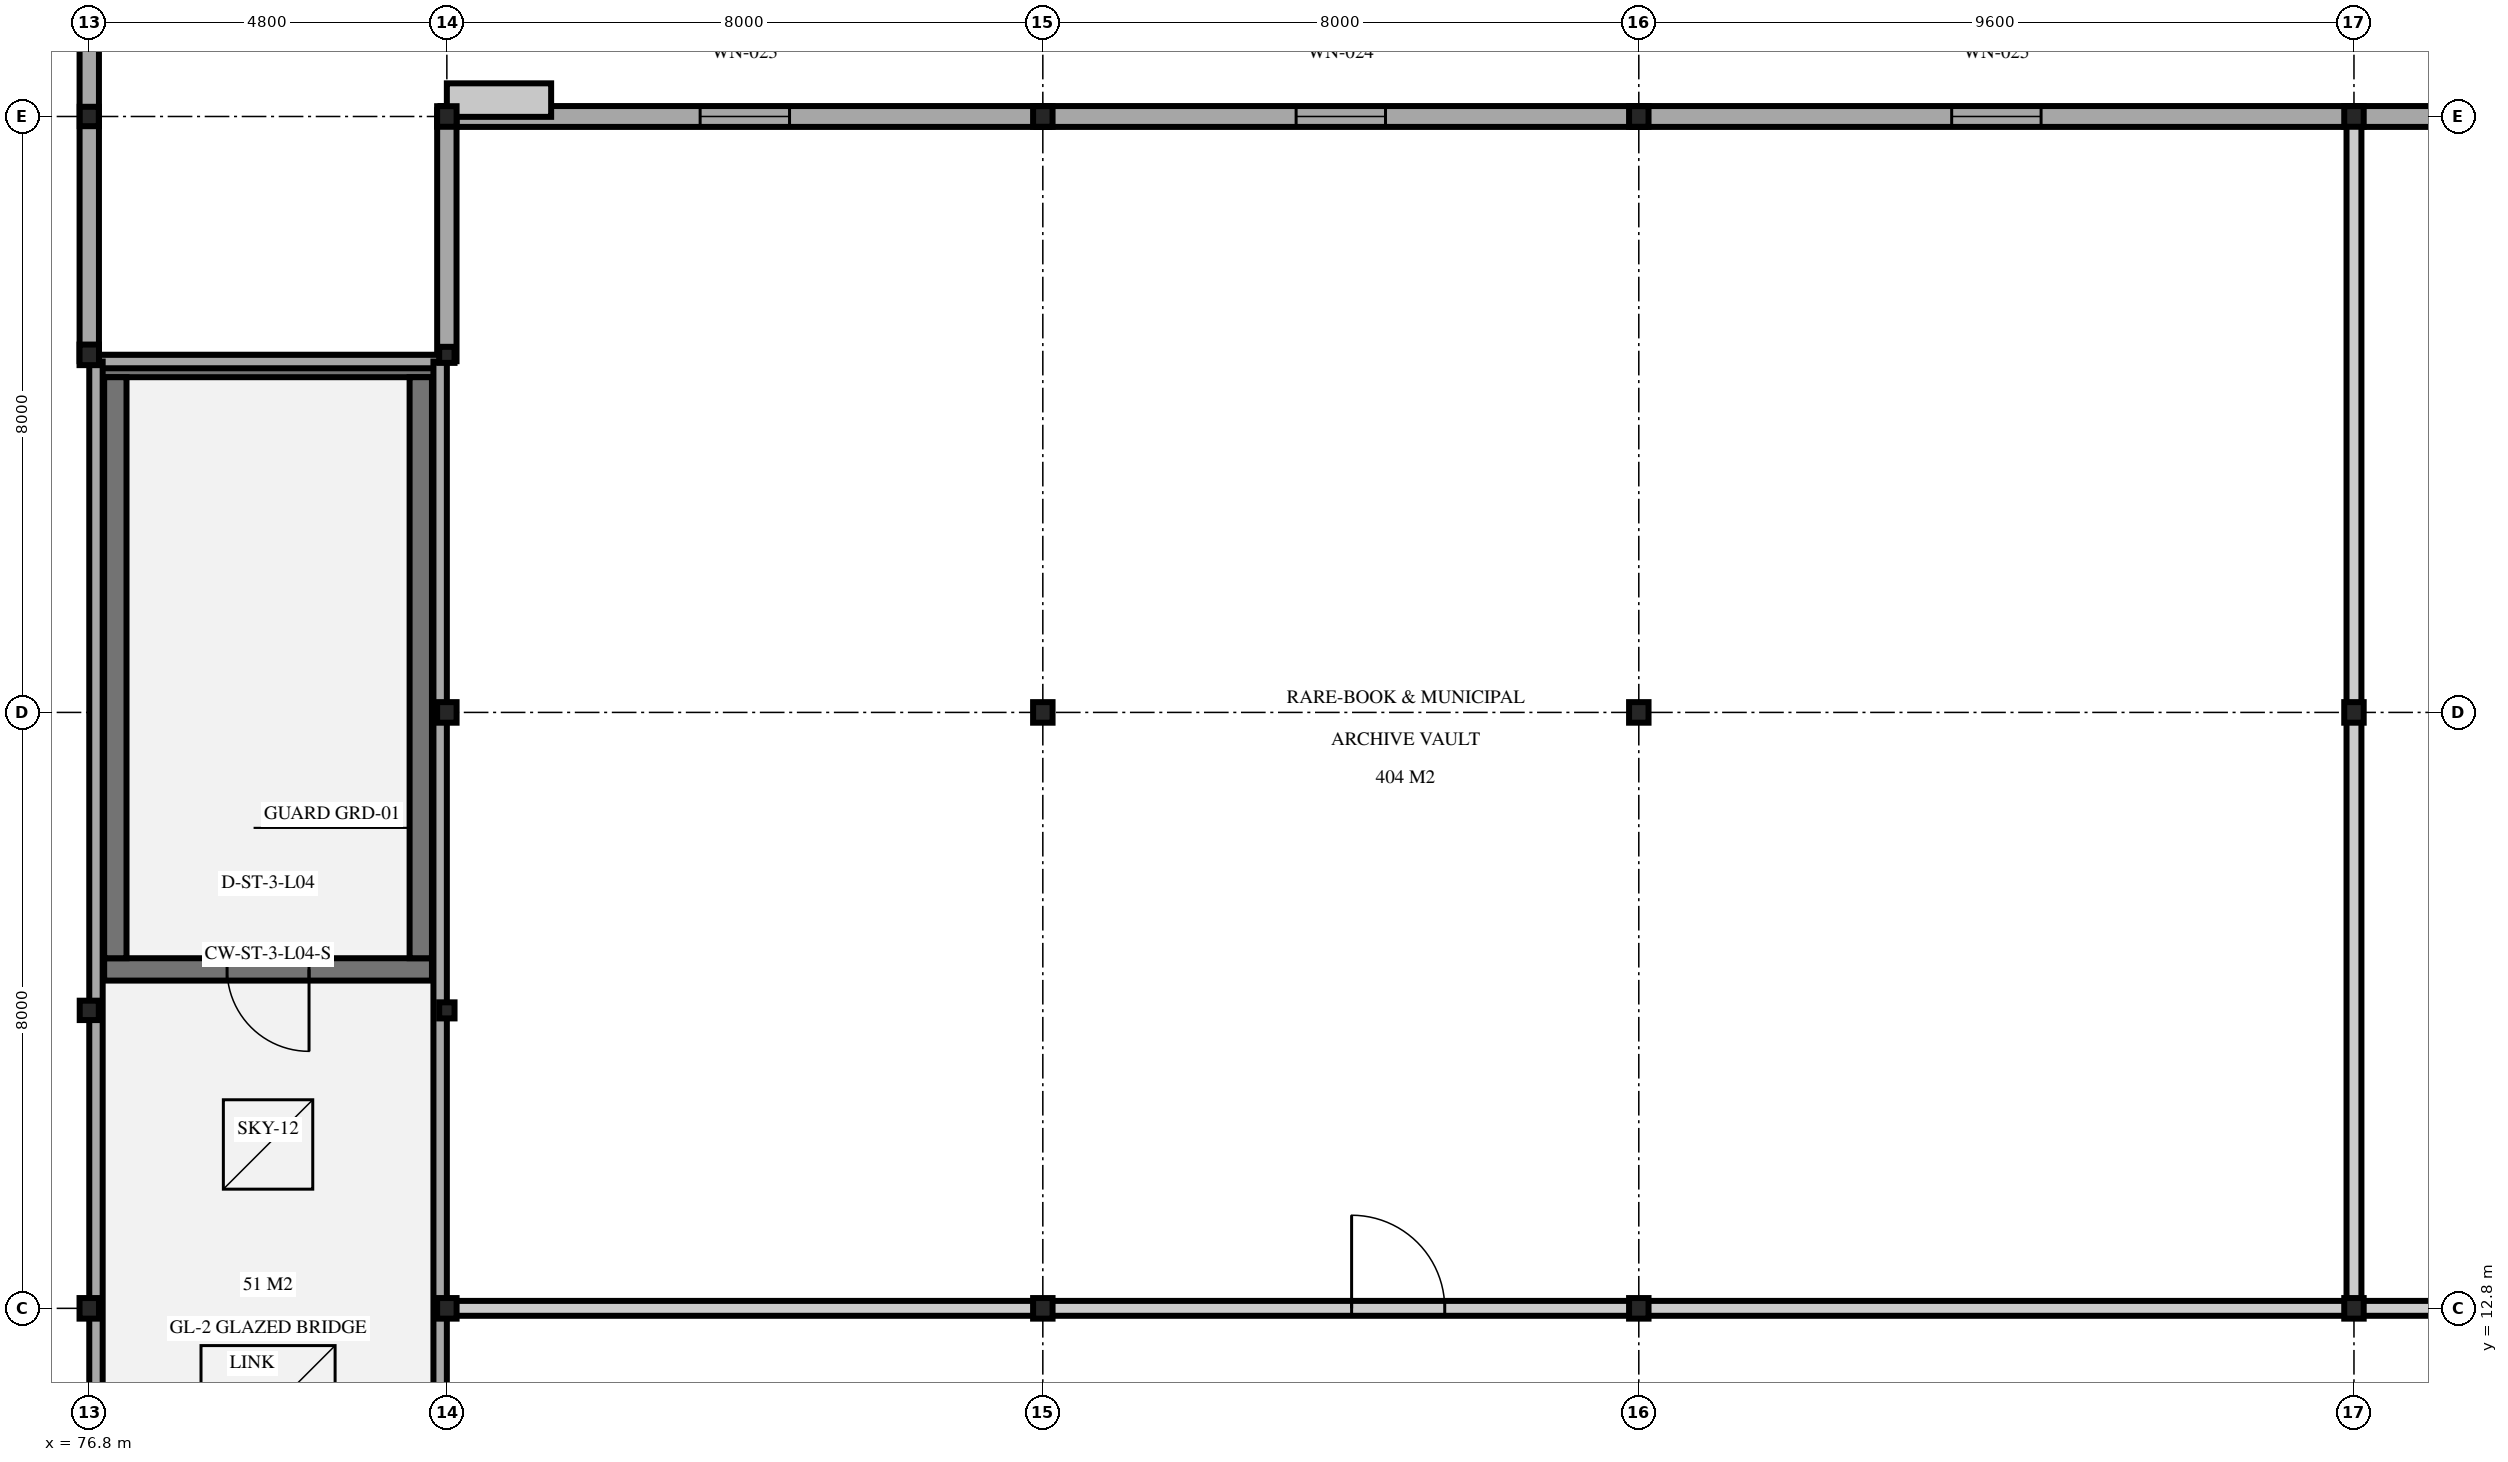
"""IFC4 building model, lengths in metres.
Left out: names, types, materials, properties, quantities, classifications, styles, units other than length and angle.
Written with IfcOpenShell. Run it as: python <this file> out.ifc"""

import sys

from ifc_helpers import new_model, si_unit, direction, frame, frame_2d, origin, origin_2d, place, context, subcontext, project, spatial, rectangle, i_section, extrude, element, fill, save


model = new_model("IFC4")
c1 = context("Model", 3, precision=1e-05, world=origin(), true_north=direction((0.0, 1.0)))
c2 = subcontext(c1, "Body", "Model", "MODEL_VIEW")
j1 = project(units=[si_unit("LENGTHUNIT", "METRE"), si_unit("PLANEANGLEUNIT", "RADIAN")], contexts=[c1])
p1 = place(None, origin())
s1 = spatial("IfcSite", under=j1, at=p1, CompositionType="ELEMENT")
p2 = place(p1, origin())
s2 = spatial("IfcBuilding", under=s1, at=p2, CompositionType="ELEMENT")
p3 = place(p2, frame((0.0, 0.0, 18.6)))
s3 = spatial("IfcBuildingStorey", under=s2, at=p3, CompositionType="ELEMENT", Elevation=18.6)
for number, where, z_axis, x_axis in (
    (1, (76.8, 12.8, 0.0), (0.0, 0.0, 1.0), (1.0, 0.0, 0.0)),
    (2, (76.8, 25.6, 0.0), (0.0, 0.0, 1.0), (1.0, 0.0, 0.0)),
):
    element("IfcColumn", number, at=place(p3, frame(where, z_axis=z_axis, x_axis=x_axis)), inside=s3, PredefinedType="COLUMN", context=c2, shape_type="SweptSolid", body=[
        extrude(i_section(OverallWidth=0.261, OverallDepth=0.276, WebThickness=0.015, FlangeThickness=0.025, at=origin_2d()), origin(), (0.0, 0.0, 1.0), 4.5),
    ])
for number, where, z_axis, x_axis in (
    (3, (76.8, 28.8, 0.0), (0.0, 0.0, 1.0), (1.0, 0.0, 0.0)),
    (4, (76.8, 16.8, 0.0), (0.0, 0.0, 1.0), (1.0, 0.0, 0.0)),
):
    element("IfcColumn", number, at=place(p3, frame(where, z_axis=z_axis, x_axis=x_axis)), inside=s3, PredefinedType="COLUMN", context=c2, shape_type="SweptSolid", body=[
        extrude(i_section(OverallWidth=0.256, OverallDepth=0.26, WebThickness=0.01, FlangeThickness=0.017, at=origin_2d()), origin(), (0.0, 0.0, 1.0), 4.5),
    ])
for number, where, z_axis, x_axis in (
    (5, (81.6, 12.8, 0.0), (0.0, 0.0, 1.0), (1.0, 0.0, 0.0)),
    (6, (81.6, 20.8, 0.0), (0.0, 0.0, 1.0), (1.0, 0.0, 0.0)),
    (7, (81.6, 28.8, 0.0), (0.0, 0.0, 1.0), (1.0, 0.0, 0.0)),
):
    element("IfcColumn", number, at=place(p3, frame(where, z_axis=z_axis, x_axis=x_axis)), inside=s3, PredefinedType="COLUMN", context=c2, shape_type="SweptSolid", body=[
        extrude(i_section(OverallWidth=0.261, OverallDepth=0.276, WebThickness=0.015, FlangeThickness=0.025, at=origin_2d()), origin(), (0.0, 0.0, 1.0), 3.795),
    ])
for number, where, z_axis, x_axis in (
    (8, (89.6, 12.8, 0.0), (0.0, 0.0, 1.0), (1.0, 0.0, 0.0)),
    (9, (89.6, 20.8, 0.0), (0.0, 0.0, 1.0), (1.0, 0.0, 0.0)),
    (10, (89.6, 28.8, 0.0), (0.0, 0.0, 1.0), (1.0, 0.0, 0.0)),
    (11, (97.6, 12.8, 0.0), (0.0, 0.0, 1.0), (1.0, 0.0, 0.0)),
    (12, (97.6, 20.8, 0.0), (0.0, 0.0, 1.0), (1.0, 0.0, 0.0)),
    (13, (97.6, 28.8, 0.0), (0.0, 0.0, 1.0), (1.0, 0.0, 0.0)),
    (14, (107.2, 12.8, 0.0), (0.0, 0.0, 1.0), (1.0, 0.0, 0.0)),
    (15, (107.2, 20.8, 0.0), (0.0, 0.0, 1.0), (1.0, 0.0, 0.0)),
    (16, (107.2, 28.8, 0.0), (0.0, 0.0, 1.0), (1.0, 0.0, 0.0)),
):
    element("IfcColumn", number, at=place(p3, frame(where, z_axis=z_axis, x_axis=x_axis)), inside=s3, PredefinedType="COLUMN", context=c2, shape_type="SweptSolid", body=[
        extrude(i_section(OverallWidth=0.261, OverallDepth=0.276, WebThickness=0.015, FlangeThickness=0.025, at=origin_2d()), origin(), (0.0, 0.0, 1.0), 4.5),
    ])
for number, where, z_axis, x_axis in (
    (17, (81.6, 16.8, 0.0), (0.0, 0.0, 1.0), (1.0, 0.0, 0.0)),
    (18, (81.6, 25.6, 0.0), (0.0, 0.0, 1.0), (1.0, 0.0, 0.0)),
):
    element("IfcColumn", number, at=place(p3, frame(where, z_axis=z_axis, x_axis=x_axis)), inside=s3, PredefinedType="COLUMN", context=c2, shape_type="SweptSolid", body=[
        extrude(i_section(OverallWidth=0.206, OverallDepth=0.216, WebThickness=0.01, FlangeThickness=0.017, at=origin_2d()), origin(), (0.0, 0.0, 1.0), 3.795),
    ])
p4 = place(p3, frame((81.4, 17.35, 0.0), z_axis=(0.0, 0.0, 1.0), x_axis=(-1.0, 0.0, 0.0)))
e19 = element("IfcWall", 19, at=p4, inside=s3, PredefinedType="SHEAR", context=c2, shape_type="SweptSolid", body=[
    extrude(rectangle(XDim=4.4, YDim=0.3, at=frame_2d((2.2, 0.0))), origin(), (0.0, 0.0, 1.0), 2.605),
])
p5 = place(p4, frame((1.65, 0.0, 0.0)))
e20 = element("IfcOpeningElement", 20, at=p5, cuts=e19, PredefinedType="OPENING", context=c2, shape_type="SweptSolid", body=[
    extrude(rectangle(XDim=1.1, YDim=2.2, at=frame_2d((0.55, 1.1))), frame((0.0, 0.16, 0.0), z_axis=(0.0, -1.0, 0.0), x_axis=(1.0, 0.0, 0.0)), (0.0, 0.0, 1.0), 0.32),
])
p6 = place(p3, frame((76.82, 25.45, 0.0), z_axis=(0.0, 0.0, 1.0), x_axis=(1.0, 0.0, 0.0)))
e21 = element("IfcWall", 21, at=p6, inside=s3, PredefinedType="SHEAR", context=c2, shape_type="SweptSolid", body=[
    extrude(rectangle(XDim=4.76, YDim=0.3, at=frame_2d((2.38, 0.0))), origin(), (0.0, 0.0, 1.0), 2.605),
])
for number, where, z_axis, x_axis in (
    (22, (77.15, 17.5, 0.0), (0.0, 0.0, 1.0), (0.0, 1.0, 0.0)),
    (23, (81.25, 25.3, 0.0), (0.0, 0.0, 1.0), (0.0, -1.0, 0.0)),
):
    element("IfcWall", number, at=place(p3, frame(where, z_axis=z_axis, x_axis=x_axis)), inside=s3, PredefinedType="SHEAR", context=c2, shape_type="SweptSolid", body=[
        extrude(rectangle(XDim=7.8, YDim=0.3, at=frame_2d((3.9, 0.0))), origin(), (0.0, 0.0, 1.0), 2.605),
    ])
p7 = place(p3, frame((76.8, 36.885, 0.0), z_axis=(0.0, 0.0, 1.0), x_axis=(0.0, -1.0, 0.0)))
e24 = element("IfcWall", 24, at=p7, inside=s3, PredefinedType="SOLIDWALL", context=c2, shape_type="SweptSolid", body=[
    extrude(rectangle(XDim=11.37, YDim=0.26, at=frame_2d((5.685, 0.0))), origin(), (0.0, 0.0, 1.0), 3.855),
])
p8 = place(p3, frame((81.515, 28.8, 0.0), z_axis=(0.0, 0.0, 1.0), x_axis=(1.0, 0.0, 0.0)))
e25 = element("IfcWall", 25, at=p8, inside=s3, PredefinedType="SOLIDWALL", context=c2, shape_type="SweptSolid", body=[
    extrude(rectangle(XDim=8.17, YDim=0.28, at=frame_2d((4.085, 0.0))), origin(), (0.0, 0.0, 1.0), 3.471),
])
p9 = place(p8, frame((3.485, 0.0, 1.2)))
e26 = element("IfcOpeningElement", 26, at=p9, cuts=e25, PredefinedType="OPENING", context=c2, shape_type="SweptSolid", body=[
    extrude(rectangle(XDim=1.2, YDim=1.5, at=frame_2d((0.6, 0.75))), frame((0.0, 0.15, 0.0), z_axis=(0.0, -1.0, 0.0), x_axis=(1.0, 0.0, 0.0)), (0.0, 0.0, 1.0), 0.3),
])
p10 = place(p3, frame((89.515, 28.8, 0.0), z_axis=(0.0, 0.0, 1.0), x_axis=(1.0, 0.0, 0.0)))
e27 = element("IfcWall", 27, at=p10, inside=s3, PredefinedType="SOLIDWALL", context=c2, shape_type="SweptSolid", body=[
    extrude(rectangle(XDim=8.17, YDim=0.28, at=frame_2d((4.085, 0.0))), origin(), (0.0, 0.0, 1.0), 3.471),
])
p11 = place(p10, frame((3.485, 0.0, 1.2)))
e28 = element("IfcOpeningElement", 28, at=p11, cuts=e27, PredefinedType="OPENING", context=c2, shape_type="SweptSolid", body=[
    extrude(rectangle(XDim=1.2, YDim=1.5, at=frame_2d((0.6, 0.75))), frame((0.0, 0.15, 0.0), z_axis=(0.0, -1.0, 0.0), x_axis=(1.0, 0.0, 0.0)), (0.0, 0.0, 1.0), 0.3),
])
p12 = place(p3, frame((97.515, 28.8, 0.0), z_axis=(0.0, 0.0, 1.0), x_axis=(1.0, 0.0, 0.0)))
e29 = element("IfcWall", 29, at=p12, inside=s3, PredefinedType="SOLIDWALL", context=c2, shape_type="SweptSolid", body=[
    extrude(rectangle(XDim=9.77, YDim=0.28, at=frame_2d((4.885, 0.0))), origin(), (0.0, 0.0, 1.0), 5.249),
])
p13 = place(p12, frame((4.285, 0.0, 1.2)))
e30 = element("IfcOpeningElement", 30, at=p13, cuts=e29, PredefinedType="OPENING", context=c2, shape_type="SweptSolid", body=[
    extrude(rectangle(XDim=1.2, YDim=1.5, at=frame_2d((0.6, 0.75))), frame((0.0, 0.15, 0.0), z_axis=(0.0, -1.0, 0.0), x_axis=(1.0, 0.0, 0.0)), (0.0, 0.0, 1.0), 0.3),
])
p14 = place(p3, frame((107.115, 28.8, 0.0), z_axis=(0.0, 0.0, 1.0), x_axis=(1.0, 0.0, 0.0)))
e31 = element("IfcWall", 31, at=p14, inside=s3, PredefinedType="SOLIDWALL", context=c2, shape_type="SweptSolid", body=[
    extrude(rectangle(XDim=9.77, YDim=0.28, at=frame_2d((4.885, 0.0))), origin(), (0.0, 0.0, 1.0), 7.027),
])
p15 = place(p14, frame((4.285, 0.0, 1.2)))
e32 = element("IfcOpeningElement", 32, at=p15, cuts=e31, PredefinedType="OPENING", context=c2, shape_type="SweptSolid", body=[
    extrude(rectangle(XDim=1.2, YDim=1.5, at=frame_2d((0.6, 0.75))), frame((0.0, 0.15, 0.0), z_axis=(0.0, -1.0, 0.0), x_axis=(1.0, 0.0, 0.0)), (0.0, 0.0, 1.0), 0.3),
])
p16 = place(p3, frame((81.6, 25.515, 0.0), z_axis=(0.0, 0.0, 1.0), x_axis=(0.0, 1.0, 0.0)))
e33 = element("IfcWall", 33, at=p16, inside=s3, PredefinedType="SOLIDWALL", context=c2, shape_type="SweptSolid", body=[
    extrude(rectangle(XDim=3.37, YDim=0.26, at=frame_2d((1.685, 0.0))), origin(), (0.0, 0.0, 1.0), 3.471),
])
p17 = place(p3, frame((76.89, 25.51, 2.85), z_axis=(0.0, 0.0, 1.0), x_axis=(1.0, 0.0, 0.0)))
e34 = element("IfcWall", 34, at=p17, inside=s3, PredefinedType="PARAPET", context=c2, shape_type="SweptSolid", body=[
    extrude(rectangle(XDim=4.62, YDim=0.18, at=frame_2d((2.31, 0.0))), origin(), (0.0, 0.0, 1.0), 0.45),
])
for number, where, z_axis, x_axis in (
    (35, (76.89, 7.29, 2.85), (0.0, 0.0, 1.0), (0.0, 1.0, 0.0)),
    (36, (81.51, 25.51, 2.85), (0.0, 0.0, 1.0), (0.0, -1.0, 0.0)),
):
    element("IfcWall", number, at=place(p3, frame(where, z_axis=z_axis, x_axis=x_axis)), inside=s3, PredefinedType="PARAPET", context=c2, shape_type="SweptSolid", body=[
        extrude(rectangle(XDim=18.22, YDim=0.18, at=frame_2d((9.11, 0.0))), origin(), (0.0, 0.0, 1.0), 0.45),
    ])
p18 = place(p3, frame((81.64, 12.8, 0.0), z_axis=(0.0, 0.0, 1.0), x_axis=(1.0, 0.0, 0.0)))
e37 = element("IfcWall", 37, at=p18, inside=s3, PredefinedType="PARTITIONING", context=c2, shape_type="SweptSolid", body=[
    extrude(rectangle(XDim=25.46, YDim=0.2, at=frame_2d((12.73, 0.0))), origin(), (0.0, 0.0, 1.0), 3.471),
])
p19 = place(p18, frame((12.105, 0.0, 0.0)))
e38 = element("IfcOpeningElement", 38, at=p19, cuts=e37, PredefinedType="OPENING", context=c2, shape_type="SweptSolid", body=[
    extrude(rectangle(XDim=1.25, YDim=2.25, at=frame_2d((0.625, 1.125))), frame((0.0, 0.11, 0.0), z_axis=(0.0, -1.0, 0.0), x_axis=(1.0, 0.0, 0.0)), (0.0, 0.0, 1.0), 0.22),
])
p20 = place(p3, frame((107.2, 12.7, 0.0), z_axis=(0.0, 0.0, 1.0), x_axis=(0.0, 1.0, 0.0)))
e39 = element("IfcWall", 39, at=p20, inside=s3, PredefinedType="PARTITIONING", context=c2, shape_type="SweptSolid", body=[
    extrude(rectangle(XDim=16.06, YDim=0.2, at=frame_2d((8.03, 0.0))), origin(), (0.0, 0.0, 1.0), 7.027),
])
p21 = place(p3, frame((107.2, 12.8, 0.0), z_axis=(0.0, 0.0, 1.0), x_axis=(1.0, 0.0, 0.0)))
e40 = element("IfcWall", 40, at=p21, inside=s3, PredefinedType="PARTITIONING", context=c2, shape_type="SweptSolid", body=[
    extrude(rectangle(XDim=17.56, YDim=0.2, at=frame_2d((8.78, 0.0))), origin(), (0.0, 0.0, 1.0), 7.027),
])
p22 = place(p21, frame((6.905, 0.0, 0.0)))
e41 = element("IfcOpeningElement", 41, at=p22, cuts=e40, PredefinedType="OPENING", context=c2, shape_type="SweptSolid", body=[
    extrude(rectangle(XDim=1.25, YDim=2.25, at=frame_2d((0.625, 1.125))), frame((0.0, 0.11, 0.0), z_axis=(0.0, -1.0, 0.0), x_axis=(1.0, 0.0, 0.0)), (0.0, 0.0, 1.0), 0.22),
])
p23 = place(p5, origin())
e42 = element("IfcDoor", 42, at=p23, inside=s3, OperationType="SINGLE_SWING_LEFT", PredefinedType="DOOR", context=c2, shape_type="SweptSolid", body=[
    extrude(rectangle(XDim=1.1, YDim=2.2, at=frame_2d((0.55, 1.1))), frame((0.0, 0.025, 0.0), z_axis=(0.0, -1.0, 0.0), x_axis=(1.0, 0.0, 0.0)), (0.0, 0.0, 1.0), 0.05),
])
fill(e20, e42)
p24 = place(p9, origin())
e43 = element("IfcWindow", 43, at=p24, inside=s3, PartitioningType="SINGLE_PANEL", PredefinedType="WINDOW", context=c2, shape_type="SweptSolid", body=[
    extrude(rectangle(XDim=1.2, YDim=1.5, at=frame_2d((0.6, 0.75))), frame((0.0, 0.03, 0.0), z_axis=(0.0, -1.0, 0.0), x_axis=(1.0, 0.0, 0.0)), (0.0, 0.0, 1.0), 0.06),
])
fill(e26, e43)
p25 = place(p11, origin())
e44 = element("IfcWindow", 44, at=p25, inside=s3, PartitioningType="SINGLE_PANEL", PredefinedType="WINDOW", context=c2, shape_type="SweptSolid", body=[
    extrude(rectangle(XDim=1.2, YDim=1.5, at=frame_2d((0.6, 0.75))), frame((0.0, 0.03, 0.0), z_axis=(0.0, -1.0, 0.0), x_axis=(1.0, 0.0, 0.0)), (0.0, 0.0, 1.0), 0.06),
])
fill(e28, e44)
p26 = place(p13, origin())
e45 = element("IfcWindow", 45, at=p26, inside=s3, PartitioningType="SINGLE_PANEL", PredefinedType="WINDOW", context=c2, shape_type="SweptSolid", body=[
    extrude(rectangle(XDim=1.2, YDim=1.5, at=frame_2d((0.6, 0.75))), frame((0.0, 0.03, 0.0), z_axis=(0.0, -1.0, 0.0), x_axis=(1.0, 0.0, 0.0)), (0.0, 0.0, 1.0), 0.06),
])
fill(e30, e45)
p27 = place(p3, frame((0.0, 0.0, 2.6)))
p28 = place(p27, frame((79.2, 11.4, 0.2)))
e46 = element("IfcWindow", 46, at=p28, inside=s3, PartitioningType="SINGLE_PANEL", PredefinedType="SKYLIGHT", context=c2, shape_type="SweptSolid", body=[
    extrude(rectangle(XDim=1.8, YDim=1.8, at=origin_2d()), origin(), (0.0, 0.0, 1.0), 0.05),
])
p29 = place(p27, frame((79.2, 15.0, 0.2)))
e47 = element("IfcWindow", 47, at=p29, inside=s3, PartitioningType="SINGLE_PANEL", PredefinedType="SKYLIGHT", context=c2, shape_type="SweptSolid", body=[
    extrude(rectangle(XDim=1.2, YDim=1.2, at=origin_2d()), origin(), (0.0, 0.0, 1.0), 0.05),
])
p30 = place(p19, origin())
e48 = element("IfcDoor", 48, at=p30, inside=s3, OperationType="SINGLE_SWING_LEFT", PredefinedType="DOOR", context=c2, shape_type="SweptSolid", body=[
    extrude(rectangle(XDim=1.25, YDim=2.25, at=frame_2d((0.625, 1.125))), frame((0.0, 0.025, 0.0), z_axis=(0.0, -1.0, 0.0), x_axis=(1.0, 0.0, 0.0)), (0.0, 0.0, 1.0), 0.05),
])
fill(e38, e48)
save(model, sys.argv[1])
